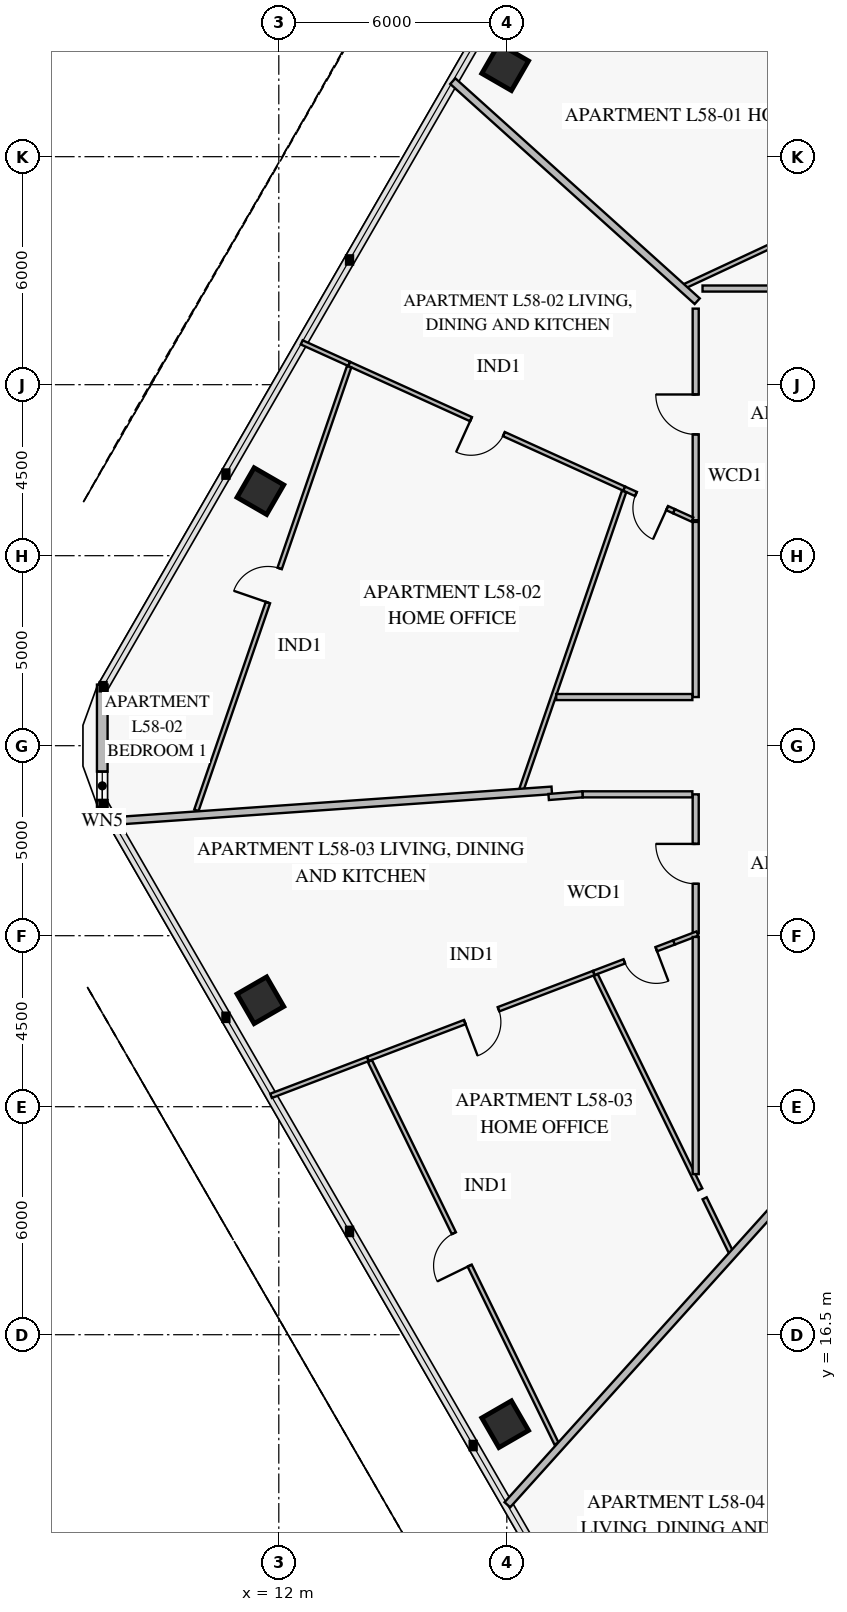
"""IFC4 building model, lengths in metres.
Left out: names, types, materials, properties, quantities, classifications, styles, units other than length and angle.
Written with IfcOpenShell. Run it as: python <this file> out.ifc"""

import sys

from ifc_helpers import new_model, si_unit, direction, frame, frame_2d, origin, origin_2d, place, context, subcontext, project, spatial, rectangle, extrude, element, fill, save


model = new_model("IFC4")
c1 = context("Model", 3, precision=1e-05, world=origin(), true_north=direction((0.0, 1.0)))
c2 = subcontext(c1, "Body", "Model", "MODEL_VIEW")
j1 = project(units=[si_unit("LENGTHUNIT", "METRE"), si_unit("PLANEANGLEUNIT", "RADIAN")], contexts=[c1])
p1 = place(None, origin())
s1 = spatial("IfcSite", under=j1, at=p1, CompositionType="ELEMENT")
p2 = place(p1, origin())
s2 = spatial("IfcBuilding", under=s1, at=p2, CompositionType="ELEMENT")
p3 = place(p2, frame((0.0, 0.0, 231.2)))
s3 = spatial("IfcBuildingStorey", under=s2, at=p3, CompositionType="ELEMENT", Elevation=231.2)
for number, where, z_axis, x_axis in (
    (1, (17.956, 49.855, 0.0), (0.0, 0.0, 1.0), (-0.5, -0.866, 0.0)),
    (2, (11.515, 38.699, 0.0), (0.0, 0.0, 1.0), (-0.5, -0.866, 0.0)),
    (3, (11.515, 25.301, 0.0), (0.0, 0.0, 1.0), (0.5, -0.866, 0.0)),
    (4, (17.956, 14.145, 0.0), (0.0, 0.0, 1.0), (0.5, -0.866, 0.0)),
):
    element("IfcColumn", number, at=place(p3, frame(where, z_axis=z_axis, x_axis=x_axis)), inside=s3, PredefinedType="COLUMN", context=c2, shape_type="SweptSolid", body=[
        extrude(rectangle(XDim=0.9, YDim=0.9, at=origin_2d()), origin(), (0.0, 0.0, 1.0), 3.55),
    ])
p4 = place(p3, frame((7.355, 30.393, 0.0), z_axis=(0.0, 0.0, 1.0), x_axis=(0.0, 1.0, 0.0)))
e5 = element("IfcWall", 5, at=p4, inside=s3, PredefinedType="SOLIDWALL", context=c2, shape_type="SweptSolid", body=[
    extrude(rectangle(XDim=3.215, YDim=0.28, at=frame_2d((1.607, 0.0))), origin(), (0.0, 0.0, 1.0), 3.55),
])
p5 = place(p4, frame((0.176, 0.0, 0.85)))
e6 = element("IfcOpeningElement", 6, at=p5, cuts=e5, PredefinedType="OPENING", context=c2, shape_type="SweptSolid", body=[
    extrude(rectangle(XDim=0.75, YDim=1.5, at=frame_2d((0.375, 0.75))), frame((0.0, 0.152, 0.0), z_axis=(0.0, -1.0, 0.0), x_axis=(1.0, 0.0, 0.0)), (0.0, 0.0, 1.0), 0.304),
])
p6 = place(p3, frame((22.4, 38.169, 0.0), z_axis=(0.0, 0.0, 1.0), x_axis=(-0.910638522973, 0.413203921178, 0.0)))
e7 = element("IfcWall", 7, at=p6, inside=s3, PredefinedType="PARTITIONING", context=c2, shape_type="SweptSolid", body=[
    extrude(rectangle(XDim=1.443, YDim=0.12, at=frame_2d((0.722, 0.0))), origin(), (0.0, 0.0, 1.0), 3.55),
])
p7 = place(p6, frame((0.2, 0.0, 0.0)))
e8 = element("IfcOpeningElement", 8, at=p7, cuts=e7, PredefinedType="OPENING", context=c2, shape_type="SweptSolid", body=[
    extrude(rectangle(XDim=0.9, YDim=2.1, at=frame_2d((0.45, 1.05))), frame((0.0, 0.072, 0.0), z_axis=(0.0, -1.0, 0.0), x_axis=(1.0, 0.0, 0.0)), (0.0, 0.0, 1.0), 0.144),
])
p8 = place(p3, frame((21.085, 38.766, 0.0), z_axis=(0.0, 0.0, 1.0), x_axis=(-0.91068296075, 0.413105973085, 0.0)))
e9 = element("IfcWall", 9, at=p8, inside=s3, PredefinedType="PARTITIONING", context=c2, shape_type="SweptSolid", body=[
    extrude(rectangle(XDim=7.945, YDim=0.12, at=frame_2d((3.973, 0.0))), origin(), (0.0, 0.0, 1.0), 3.15),
])
p9 = place(p8, frame((3.473, 0.0, 0.0)))
e10 = element("IfcOpeningElement", 10, at=p9, cuts=e9, PredefinedType="OPENING", context=c2, shape_type="SweptSolid", body=[
    extrude(rectangle(XDim=0.95, YDim=2.1, at=frame_2d((0.475, 1.05))), frame((0.0, 0.072, 0.0), z_axis=(0.0, -1.0, 0.0), x_axis=(1.0, 0.0, 0.0)), (0.0, 0.0, 1.0), 0.144),
])
p10 = place(p3, frame((13.85, 41.973, 0.0), z_axis=(0.0, 0.0, 1.0), x_axis=(-0.325567715509, -0.945518726741, 0.0)))
e11 = element("IfcWall", 11, at=p10, inside=s3, PredefinedType="PARTITIONING", context=c2, shape_type="SweptSolid", body=[
    extrude(rectangle(XDim=12.346, YDim=0.12, at=frame_2d((6.173, 0.0))), origin(), (0.0, 0.0, 1.0), 2.93),
])
p11 = place(p10, frame((5.614, 0.0, 0.0)))
e12 = element("IfcOpeningElement", 12, at=p11, cuts=e11, PredefinedType="OPENING", context=c2, shape_type="SweptSolid", body=[
    extrude(rectangle(XDim=0.95, YDim=2.1, at=frame_2d((0.475, 1.05))), frame((0.0, 0.072, 0.0), z_axis=(0.0, -1.0, 0.0), x_axis=(1.0, 0.0, 0.0)), (0.0, 0.0, 1.0), 0.144),
])
p12 = place(p3, frame((22.97, 43.501, 0.0), z_axis=(0.0, 0.0, 1.0), x_axis=(0.0, -1.0, 0.0)))
e13 = element("IfcWall", 13, at=p12, inside=s3, PredefinedType="PARTITIONING", context=c2, shape_type="SweptSolid", body=[
    extrude(rectangle(XDim=5.569, YDim=0.16, at=frame_2d((2.784, 0.0))), origin(), (0.0, 0.0, 1.0), 3.55),
])
p13 = place(p12, frame((2.259, 0.0, 0.0)))
e14 = element("IfcOpeningElement", 14, at=p13, cuts=e13, PredefinedType="OPENING", context=c2, shape_type="SweptSolid", body=[
    extrude(rectangle(XDim=1.05, YDim=2.15, at=frame_2d((0.525, 1.075))), frame((0.0, 0.092, 0.0), z_axis=(0.0, -1.0, 0.0), x_axis=(1.0, 0.0, 0.0)), (0.0, 0.0, 1.0), 0.184),
])
p14 = place(p3, frame((22.4, 26.823, 0.0), z_axis=(0.0, 0.0, 1.0), x_axis=(-0.934561226784, -0.355802351583, 0.0)))
e15 = element("IfcWall", 15, at=p14, inside=s3, PredefinedType="PARTITIONING", context=c2, shape_type="SweptSolid", body=[
    extrude(rectangle(XDim=2.262, YDim=0.12, at=frame_2d((1.131, 0.0))), origin(), (0.0, 0.0, 1.0), 3.55),
])
p15 = place(p14, frame((0.5, 0.0, 0.0)))
e16 = element("IfcOpeningElement", 16, at=p15, cuts=e15, PredefinedType="OPENING", context=c2, shape_type="SweptSolid", body=[
    extrude(rectangle(XDim=0.9, YDim=2.1, at=frame_2d((0.45, 1.05))), frame((0.0, 0.072, 0.0), z_axis=(0.0, -1.0, 0.0), x_axis=(1.0, 0.0, 0.0)), (0.0, 0.0, 1.0), 0.144),
])
p16 = place(p3, frame((20.286, 26.018, 0.0), z_axis=(0.0, 0.0, 1.0), x_axis=(-0.934578936747, -0.355755830577, 0.0)))
e17 = element("IfcWall", 17, at=p16, inside=s3, PredefinedType="PARTITIONING", context=c2, shape_type="SweptSolid", body=[
    extrude(rectangle(XDim=6.359, YDim=0.12, at=frame_2d((3.179, 0.0))), origin(), (0.0, 0.0, 1.0), 3.15),
])
p17 = place(p16, frame((2.679, 0.0, 0.0)))
e18 = element("IfcOpeningElement", 18, at=p17, cuts=e17, PredefinedType="OPENING", context=c2, shape_type="SweptSolid", body=[
    extrude(rectangle(XDim=0.95, YDim=2.1, at=frame_2d((0.475, 1.05))), frame((0.0, 0.072, 0.0), z_axis=(0.0, -1.0, 0.0), x_axis=(1.0, 0.0, 0.0)), (0.0, 0.0, 1.0), 0.144),
])
p18 = place(p3, frame((14.396, 23.703, 0.0), z_axis=(0.0, 0.0, 1.0), x_axis=(0.438369959887, -0.898794625189, 0.0)))
e19 = element("IfcWall", 19, at=p18, inside=s3, PredefinedType="PARTITIONING", context=c2, shape_type="SweptSolid", body=[
    extrude(rectangle(XDim=11.203, YDim=0.12, at=frame_2d((5.601, 0.0))), origin(), (0.0, 0.0, 1.0), 2.95),
])
p19 = place(p18, frame((5.042, 0.0, 0.0)))
e20 = element("IfcOpeningElement", 20, at=p19, cuts=e19, PredefinedType="OPENING", context=c2, shape_type="SweptSolid", body=[
    extrude(rectangle(XDim=0.95, YDim=2.1, at=frame_2d((0.475, 1.05))), frame((0.0, 0.072, 0.0), z_axis=(0.0, -1.0, 0.0), x_axis=(1.0, 0.0, 0.0)), (0.0, 0.0, 1.0), 0.144),
])
p20 = place(p3, frame((22.97, 30.72, 0.0), z_axis=(0.0, 0.0, 1.0), x_axis=(0.0, -1.0, 0.0)))
e21 = element("IfcWall", 21, at=p20, inside=s3, PredefinedType="PARTITIONING", context=c2, shape_type="SweptSolid", body=[
    extrude(rectangle(XDim=3.659, YDim=0.16, at=frame_2d((1.829, 0.0))), origin(), (0.0, 0.0, 1.0), 2.95),
])
p21 = place(p20, frame((1.304, 0.0, 0.0)))
e22 = element("IfcOpeningElement", 22, at=p21, cuts=e21, PredefinedType="OPENING", context=c2, shape_type="SweptSolid", body=[
    extrude(rectangle(XDim=1.05, YDim=2.15, at=frame_2d((0.525, 1.075))), frame((0.0, 0.092, 0.0), z_axis=(0.0, -1.0, 0.0), x_axis=(1.0, 0.0, 0.0)), (0.0, 0.0, 1.0), 0.184),
])
p22 = place(p3, frame((30.349, 47.668, 0.0), z_axis=(0.0, 0.0, 1.0), x_axis=(-0.906307413794, -0.422619062162, 0.0)))
e23 = element("IfcWall", 23, at=p22, inside=s3, PredefinedType="PARTITIONING", context=c2, shape_type="SweptSolid", body=[
    extrude(rectangle(XDim=8.479, YDim=0.12, at=frame_2d((4.24, 0.0))), origin(), (0.0, 0.0, 1.0), 2.95),
])
p23 = place(p3, frame((23.01, 43.696, 0.0), z_axis=(0.0, 0.0, 1.0), x_axis=(-0.743146853016, 0.669128354542, 0.0)))
e24 = element("IfcWall", 24, at=p23, inside=s3, PredefinedType="PARTITIONING", context=c2, shape_type="SweptSolid", body=[
    extrude(rectangle(XDim=8.655, YDim=0.2, at=frame_2d((4.328, 0.0))), origin(), (0.0, 0.0, 1.0), 2.93),
])
p24 = place(p3, frame((22.882, 37.951, 0.0), z_axis=(0.0, 0.0, 1.0), x_axis=(-0.910839700521, 0.41276026935, 0.0)))
e25 = element("IfcWall", 25, at=p24, inside=s3, PredefinedType="PARTITIONING", context=c2, shape_type="SweptSolid", body=[
    extrude(rectangle(XDim=0.529, YDim=0.12, at=frame_2d((0.265, 0.0))), origin(), (0.0, 0.0, 1.0), 3.55),
])
p25 = place(p3, frame((13.85, 42.048, 0.0), z_axis=(0.0, 0.0, 1.0), x_axis=(-0.910665587289, 0.413144270355, 0.0)))
e26 = element("IfcWall", 26, at=p25, inside=s3, PredefinedType="PARTITIONING", context=c2, shape_type="SweptSolid", body=[
    extrude(rectangle(XDim=1.369, YDim=0.12, at=frame_2d((0.684, 0.0))), origin(), (0.0, 0.0, 1.0), 2.93),
])
p26 = place(p3, frame((21.086, 38.691, 0.0), z_axis=(0.0, 0.0, 1.0), x_axis=(-0.325576573931, -0.9455156765, 0.0)))
e27 = element("IfcWall", 27, at=p26, inside=s3, PredefinedType="PARTITIONING", context=c2, shape_type="SweptSolid", body=[
    extrude(rectangle(XDim=8.322, YDim=0.12, at=frame_2d((4.161, 0.0))), origin(), (0.0, 0.0, 1.0), 2.95),
])
p27 = place(p3, frame((19.183, 30.824, 0.0), z_axis=(0.0, 0.0, 1.0), x_axis=(-0.997565085498, -0.069741667573, 0.0)))
e28 = element("IfcWall", 28, at=p27, inside=s3, PredefinedType="PARTITIONING", context=c2, shape_type="SweptSolid", body=[
    extrude(rectangle(XDim=11.584, YDim=0.2, at=frame_2d((5.792, 0.0))), origin(), (0.0, 0.0, 1.0), 2.93),
])
p28 = place(p3, frame((23.013, 27.056, 0.0), z_axis=(0.0, 0.0, 1.0), x_axis=(-0.934605562939, -0.355685875068, 0.0)))
e29 = element("IfcWall", 29, at=p28, inside=s3, PredefinedType="PARTITIONING", context=c2, shape_type="SweptSolid", body=[
    extrude(rectangle(XDim=0.656, YDim=0.12, at=frame_2d((0.328, 0.0))), origin(), (0.0, 0.0, 1.0), 3.55),
])
p29 = place(p3, frame((14.343, 23.756, 0.0), z_axis=(0.0, 0.0, 1.0), x_axis=(-0.93457995238, -0.355753162472, 0.0)))
e30 = element("IfcWall", 30, at=p29, inside=s3, PredefinedType="PARTITIONING", context=c2, shape_type="SweptSolid", body=[
    extrude(rectangle(XDim=2.725, YDim=0.12, at=frame_2d((1.363, 0.0))), origin(), (0.0, 0.0, 1.0), 2.93),
])
p30 = place(p3, frame((20.339, 25.966, 0.0), z_axis=(0.0, 0.0, 1.0), x_axis=(0.438368444203, -0.898795364433, 0.0)))
e31 = element("IfcWall", 31, at=p30, inside=s3, PredefinedType="PARTITIONING", context=c2, shape_type="SweptSolid", body=[
    extrude(rectangle(XDim=6.275, YDim=0.12, at=frame_2d((3.138, 0.0))), origin(), (0.0, 0.0, 1.0), 3.55),
])
p31 = place(p3, frame((23.205, 20.09, 0.0), z_axis=(0.0, 0.0, 1.0), x_axis=(0.43839655559, -0.898781653154, 0.0)))
e32 = element("IfcWall", 32, at=p31, inside=s3, PredefinedType="PARTITIONING", context=c2, shape_type="SweptSolid", body=[
    extrude(rectangle(XDim=1.599, YDim=0.12, at=frame_2d((0.799, 0.0))), origin(), (0.0, 0.0, 1.0), 2.95),
])
p32 = place(p3, frame((25.204, 20.01, 0.0), z_axis=(0.0, 0.0, 1.0), x_axis=(-0.669124143022, -0.743150645041, 0.0)))
e33 = element("IfcWall", 33, at=p32, inside=s3, PredefinedType="PARTITIONING", context=c2, shape_type="SweptSolid", body=[
    extrude(rectangle(XDim=10.745, YDim=0.2, at=frame_2d((5.373, 0.0))), origin(), (0.0, 0.0, 1.0), 2.93),
])
p33 = place(p3, frame((31.644, 44.03, 0.0), z_axis=(0.0, 0.0, 1.0), x_axis=(-1.0, 0.0, 0.0)))
e34 = element("IfcWall", 34, at=p33, inside=s3, PredefinedType="PARTITIONING", context=c2, shape_type="SweptSolid", body=[
    extrude(rectangle(XDim=8.494, YDim=0.16, at=frame_2d((4.247, 0.0))), origin(), (0.0, 0.0, 1.0), 2.95),
])
p34 = place(p3, frame((22.97, 37.889, 0.0), z_axis=(0.0, 0.0, 1.0), x_axis=(0.0, -1.0, 0.0)))
e35 = element("IfcWall", 35, at=p34, inside=s3, PredefinedType="PARTITIONING", context=c2, shape_type="SweptSolid", body=[
    extrude(rectangle(XDim=4.609, YDim=0.16, at=frame_2d((2.304, 0.0))), origin(), (0.0, 0.0, 1.0), 2.95),
])
p35 = place(p3, frame((22.882, 33.28, 0.0), z_axis=(0.0, 0.0, 1.0), x_axis=(-1.0, 0.0, 0.0)))
e36 = element("IfcWall", 36, at=p35, inside=s3, PredefinedType="PARTITIONING", context=c2, shape_type="SweptSolid", body=[
    extrude(rectangle(XDim=3.582, YDim=0.16, at=frame_2d((1.791, 0.0))), origin(), (0.0, 0.0, 1.0), 3.55),
])
p36 = place(p3, frame((19.991, 30.72, 0.0), z_axis=(0.0, 0.0, 1.0), x_axis=(1.0, 0.0, 0.0)))
e37 = element("IfcWall", 37, at=p36, inside=s3, PredefinedType="PARTITIONING", context=c2, shape_type="SweptSolid", body=[
    extrude(rectangle(XDim=2.891, YDim=0.16, at=frame_2d((1.446, 0.0))), origin(), (0.0, 0.0, 1.0), 3.55),
])
p37 = place(p3, frame((19.101, 30.65, 0.0), z_axis=(0.0, 0.0, 1.0), x_axis=(0.9969178709, 0.078452270071, 0.0)))
e38 = element("IfcWall", 38, at=p37, inside=s3, PredefinedType="PARTITIONING", context=c2, shape_type="SweptSolid", body=[
    extrude(rectangle(XDim=0.893, YDim=0.16, at=frame_2d((0.447, 0.0))), origin(), (0.0, 0.0, 1.0), 3.55),
])
p38 = place(p3, frame((22.97, 26.967, 0.0), z_axis=(0.0, 0.0, 1.0), x_axis=(0.0, -1.0, 0.0)))
e39 = element("IfcWall", 39, at=p38, inside=s3, PredefinedType="PARTITIONING", context=c2, shape_type="SweptSolid", body=[
    extrude(rectangle(XDim=6.241, YDim=0.16, at=frame_2d((3.121, 0.0))), origin(), (0.0, 0.0, 1.0), 3.55),
])
p39 = place(p5, origin())
e40 = element("IfcWindow", 40, at=p39, inside=s3, PartitioningType="SINGLE_PANEL", PredefinedType="WINDOW", context=c2, shape_type="SweptSolid", body=[
    extrude(rectangle(XDim=0.75, YDim=1.5, at=frame_2d((0.375, 0.75))), frame((0.0, 0.03, 0.0), z_axis=(0.0, -1.0, 0.0), x_axis=(1.0, 0.0, 0.0)), (0.0, 0.0, 1.0), 0.06),
])
fill(e6, e40)
p40 = place(p7, origin())
e41 = element("IfcDoor", 41, at=p40, inside=s3, OperationType="SINGLE_SWING_LEFT", PredefinedType="DOOR", context=c2, shape_type="SweptSolid", body=[
    extrude(rectangle(XDim=0.9, YDim=2.1, at=frame_2d((0.45, 1.05))), frame((0.0, 0.025, 0.0), z_axis=(0.0, -1.0, 0.0), x_axis=(1.0, 0.0, 0.0)), (0.0, 0.0, 1.0), 0.05),
])
fill(e8, e41)
p41 = place(p9, origin())
e42 = element("IfcDoor", 42, at=p41, inside=s3, OperationType="SINGLE_SWING_RIGHT", PredefinedType="DOOR", context=c2, shape_type="SweptSolid", body=[
    extrude(rectangle(XDim=0.95, YDim=2.1, at=frame_2d((0.475, 1.05))), frame((0.0, 0.025, 0.0), z_axis=(0.0, -1.0, 0.0), x_axis=(1.0, 0.0, 0.0)), (0.0, 0.0, 1.0), 0.05),
])
fill(e10, e42)
p42 = place(p11, frame((0.95, 0.0, 0.0), z_axis=(0.0, 0.0, 1.0), x_axis=(-1.0, 0.0, 0.0)))
e43 = element("IfcDoor", 43, at=p42, inside=s3, OperationType="SINGLE_SWING_LEFT", PredefinedType="DOOR", context=c2, shape_type="SweptSolid", body=[
    extrude(rectangle(XDim=0.95, YDim=2.1, at=frame_2d((0.475, 1.05))), frame((0.0, 0.025, 0.0), z_axis=(0.0, -1.0, 0.0), x_axis=(1.0, 0.0, 0.0)), (0.0, 0.0, 1.0), 0.05),
])
fill(e12, e43)
p43 = place(p13, frame((1.05, 0.0, 0.0), z_axis=(0.0, 0.0, 1.0), x_axis=(-1.0, 0.0, 0.0)))
e44 = element("IfcDoor", 44, at=p43, inside=s3, OperationType="SINGLE_SWING_RIGHT", PredefinedType="DOOR", context=c2, shape_type="SweptSolid", body=[
    extrude(rectangle(XDim=1.05, YDim=2.15, at=frame_2d((0.525, 1.075))), frame((0.0, 0.025, 0.0), z_axis=(0.0, -1.0, 0.0), x_axis=(1.0, 0.0, 0.0)), (0.0, 0.0, 1.0), 0.05),
])
fill(e14, e44)
p44 = place(p15, origin())
e45 = element("IfcDoor", 45, at=p44, inside=s3, OperationType="SINGLE_SWING_LEFT", PredefinedType="DOOR", context=c2, shape_type="SweptSolid", body=[
    extrude(rectangle(XDim=0.9, YDim=2.1, at=frame_2d((0.45, 1.05))), frame((0.0, 0.025, 0.0), z_axis=(0.0, -1.0, 0.0), x_axis=(1.0, 0.0, 0.0)), (0.0, 0.0, 1.0), 0.05),
])
fill(e16, e45)
p45 = place(p17, origin())
e46 = element("IfcDoor", 46, at=p45, inside=s3, OperationType="SINGLE_SWING_RIGHT", PredefinedType="DOOR", context=c2, shape_type="SweptSolid", body=[
    extrude(rectangle(XDim=0.95, YDim=2.1, at=frame_2d((0.475, 1.05))), frame((0.0, 0.025, 0.0), z_axis=(0.0, -1.0, 0.0), x_axis=(1.0, 0.0, 0.0)), (0.0, 0.0, 1.0), 0.05),
])
fill(e18, e46)
p46 = place(p19, frame((0.95, 0.0, 0.0), z_axis=(0.0, 0.0, 1.0), x_axis=(-1.0, 0.0, 0.0)))
e47 = element("IfcDoor", 47, at=p46, inside=s3, OperationType="SINGLE_SWING_LEFT", PredefinedType="DOOR", context=c2, shape_type="SweptSolid", body=[
    extrude(rectangle(XDim=0.95, YDim=2.1, at=frame_2d((0.475, 1.05))), frame((0.0, 0.025, 0.0), z_axis=(0.0, -1.0, 0.0), x_axis=(1.0, 0.0, 0.0)), (0.0, 0.0, 1.0), 0.05),
])
fill(e20, e47)
p47 = place(p21, frame((1.05, 0.0, 0.0), z_axis=(0.0, 0.0, 1.0), x_axis=(-1.0, 0.0, 0.0)))
e48 = element("IfcDoor", 48, at=p47, inside=s3, OperationType="SINGLE_SWING_RIGHT", PredefinedType="DOOR", context=c2, shape_type="SweptSolid", body=[
    extrude(rectangle(XDim=1.05, YDim=2.15, at=frame_2d((0.525, 1.075))), frame((0.0, 0.025, 0.0), z_axis=(0.0, -1.0, 0.0), x_axis=(1.0, 0.0, 0.0)), (0.0, 0.0, 1.0), 0.05),
])
fill(e22, e48)
save(model, sys.argv[1])
